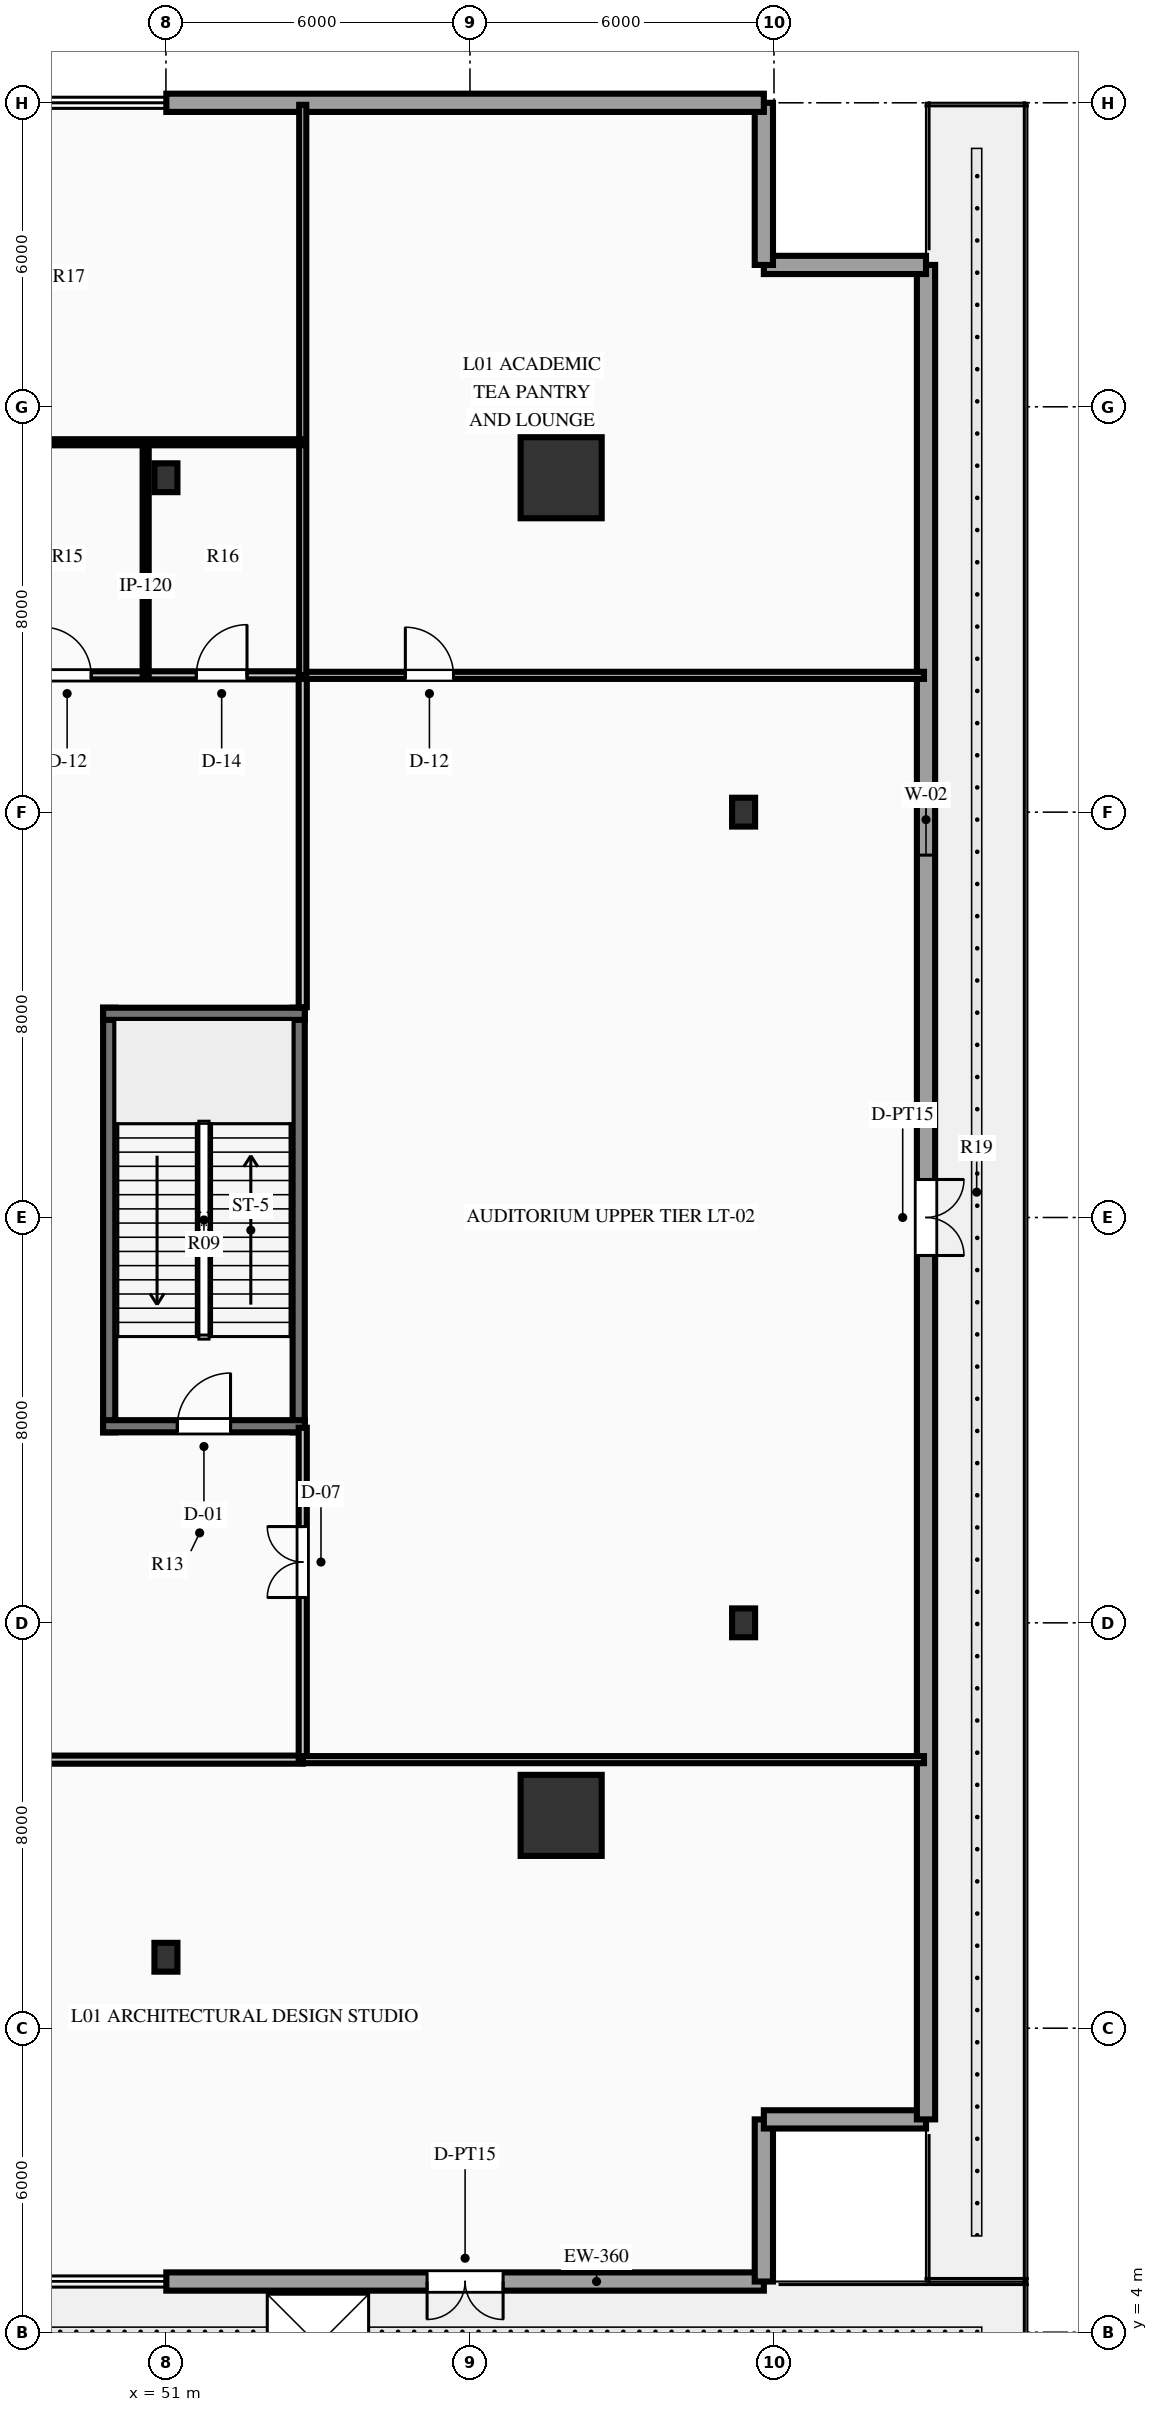
"""IFC4 building model, lengths in metres.
Left out: names, types, materials, properties, quantities, classifications, styles, units other than length and angle.
Written with IfcOpenShell. Run it as: python <this file> out.ifc"""

import sys

from ifc_helpers import new_model, si_unit, direction, frame, frame_2d, origin, origin_2d, place, context, subcontext, project, spatial, rectangle, hollow_rectangle, i_section, extrude, element, fill, save


model = new_model("IFC4")
c1 = context("Model", 3, precision=1e-05, world=origin(), true_north=direction((0.0, 1.0)))
c2 = subcontext(c1, "Body", "Model", "MODEL_VIEW")
j1 = project(units=[si_unit("LENGTHUNIT", "METRE"), si_unit("PLANEANGLEUNIT", "RADIAN")], contexts=[c1])
p1 = place(None, origin())
s1 = spatial("IfcSite", under=j1, at=p1, CompositionType="ELEMENT")
p2 = place(p1, origin())
s2 = spatial("IfcBuilding", under=s1, at=p2, CompositionType="ELEMENT")
p3 = place(p2, frame((0.0, 0.0, 6.0)))
s3 = spatial("IfcBuildingStorey", under=s2, at=p3, CompositionType="ELEMENT", Elevation=6.0)
for number, where, z_axis, x_axis in (
    (1, (49.88, 21.76, 0.0), (0.0, 0.0, 1.0), (0.0, 1.0, 0.0)),
    (2, (53.62, 21.76, 0.0), (0.0, 0.0, 1.0), (0.0, 1.0, 0.0)),
):
    element("IfcWall", number, at=place(p3, frame(where, z_axis=z_axis, x_axis=x_axis)), inside=s3, PredefinedType="SHEAR", context=c2, shape_type="SweptSolid", body=[
        extrude(rectangle(XDim=8.38, YDim=0.24, at=frame_2d((4.19, 0.0))), origin(), (0.0, 0.0, 1.0), 5.4),
    ])
p4 = place(p3, frame((49.76, 21.88, 0.0), z_axis=(0.0, 0.0, 1.0), x_axis=(1.0, 0.0, 0.0)))
e3 = element("IfcWall", 3, at=p4, inside=s3, PredefinedType="SHEAR", context=c2, shape_type="SweptSolid", body=[
    extrude(rectangle(XDim=3.98, YDim=0.24, at=frame_2d((1.99, 0.0))), origin(), (0.0, 0.0, 1.0), 5.4),
])
p5 = place(p4, frame((1.465, 0.0, 0.0)))
e4 = element("IfcOpeningElement", 4, at=p5, cuts=e3, PredefinedType="OPENING", context=c2, shape_type="SweptSolid", body=[
    extrude(rectangle(XDim=1.05, YDim=2.15, at=frame_2d((0.525, 1.075))), frame((0.0, 0.13, 0.0), z_axis=(0.0, -1.0, 0.0), x_axis=(1.0, 0.0, 0.0)), (0.0, 0.0, 1.0), 0.26),
])
p6 = place(p3, frame((49.76, 30.02, 0.0), z_axis=(0.0, 0.0, 1.0), x_axis=(1.0, 0.0, 0.0)))
e5 = element("IfcWall", 5, at=p6, inside=s3, PredefinedType="SHEAR", context=c2, shape_type="SweptSolid", body=[
    extrude(rectangle(XDim=3.98, YDim=0.24, at=frame_2d((1.99, 0.0))), origin(), (0.0, 0.0, 1.0), 5.4),
])
for number, where, z_axis, x_axis in (
    (6, (58.8, 14.2, 0.0), (0.0, 0.0, 1.0), (1.0, 0.0, 0.0)),
    (7, (58.8, 40.6, 0.0), (0.0, 0.0, 1.0), (1.0, 0.0, 0.0)),
):
    element("IfcColumn", number, at=place(p3, frame(where, z_axis=z_axis, x_axis=x_axis)), inside=s3, PredefinedType="COLUMN", context=c2, shape_type="SweptSolid", body=[
        extrude(hollow_rectangle(XDim=1.6, YDim=1.6, WallThickness=0.08, at=origin_2d()), origin(), (0.0, 0.0, 1.0), 5.4),
    ])
for number, where, z_axis, x_axis in (
    (8, (62.4, 18.0, 0.0), (0.0, 0.0, 1.0), (1.0, 0.0, 0.0)),
    (9, (62.4, 34.0, 0.0), (0.0, 0.0, 1.0), (1.0, 0.0, 0.0)),
    (10, (51.0, 11.4, 0.0), (0.0, 0.0, 1.0), (1.0, 0.0, 0.0)),
    (11, (51.0, 40.6, 0.0), (0.0, 0.0, 1.0), (1.0, 0.0, 0.0)),
):
    element("IfcColumn", number, at=place(p3, frame(where, z_axis=z_axis, x_axis=x_axis)), inside=s3, PredefinedType="COLUMN", context=c2, shape_type="SweptSolid", body=[
        extrude(i_section(OverallWidth=0.454, OverallDepth=0.569, WebThickness=0.078, FlangeThickness=0.125, at=origin_2d()), origin(), (0.0, 0.0, 1.0), 5.4),
    ])
p7 = place(p3, frame((62.8, 5.0, 0.0), z_axis=(0.0, 0.0, 1.0), x_axis=(-1.0, 0.0, 0.0)))
e12 = element("IfcWall", 12, at=p7, inside=s3, PredefinedType="STANDARD", context=c2, shape_type="SweptSolid", body=[
    extrude(rectangle(XDim=11.792, YDim=0.36, at=frame_2d((5.896, 0.0))), origin(), (0.0, 0.0, 1.0), 5.07),
])
p8 = place(p7, frame((5.146, 0.0, 0.0)))
e13 = element("IfcOpeningElement", 13, at=p8, cuts=e12, PredefinedType="OPENING", context=c2, shape_type="SweptSolid", body=[
    extrude(rectangle(XDim=1.5, YDim=2.25, at=frame_2d((0.75, 1.125))), frame((0.0, 0.19, 0.0), z_axis=(0.0, -1.0, 0.0), x_axis=(1.0, 0.0, 0.0)), (0.0, 0.0, 1.0), 0.38),
])
for number, where, z_axis, x_axis in (
    (14, (62.8, 8.2, 0.0), (0.0, 0.0, 1.0), (0.0, -1.0, 0.0)),
    (15, (66.0, 8.2, 0.0), (0.0, 0.0, 1.0), (-1.0, 0.0, 0.0)),
):
    element("IfcWall", number, at=place(p3, frame(where, z_axis=z_axis, x_axis=x_axis)), inside=s3, PredefinedType="STANDARD", context=c2, shape_type="SweptSolid", body=[
        extrude(rectangle(XDim=3.2, YDim=0.36, at=frame_2d((1.6, 0.0))), origin(), (0.0, 0.0, 1.0), 5.07),
    ])
p9 = place(p3, frame((66.0, 44.8, 0.0), z_axis=(0.0, 0.0, 1.0), x_axis=(0.0, -1.0, 0.0)))
e16 = element("IfcWall", 16, at=p9, inside=s3, PredefinedType="STANDARD", context=c2, shape_type="SweptSolid", body=[
    extrude(rectangle(XDim=36.6, YDim=0.36, at=frame_2d((18.3, 0.0))), origin(), (0.0, 0.0, 1.0), 5.07),
])
p10 = place(p9, frame((18.05, 0.0, 0.0)))
e17 = element("IfcOpeningElement", 17, at=p10, cuts=e16, PredefinedType="OPENING", context=c2, shape_type="SweptSolid", body=[
    extrude(rectangle(XDim=1.5, YDim=2.25, at=frame_2d((0.75, 1.125))), frame((0.0, 0.19, 0.0), z_axis=(0.0, -1.0, 0.0), x_axis=(1.0, 0.0, 0.0)), (0.0, 0.0, 1.0), 0.38),
])
p11 = place(p9, frame((10.248, 0.0, 1.0)))
e18 = element("IfcOpeningElement", 18, at=p11, cuts=e16, PredefinedType="OPENING", context=c2, shape_type="SweptSolid", body=[
    extrude(rectangle(XDim=1.4, YDim=2.2, at=frame_2d((0.7, 1.1))), frame((0.0, 0.19, 0.0), z_axis=(0.0, -1.0, 0.0), x_axis=(1.0, 0.0, 0.0)), (0.0, 0.0, 1.0), 0.38),
])
for number, where, z_axis, x_axis in (
    (19, (62.8, 44.8, 0.0), (0.0, 0.0, 1.0), (1.0, 0.0, 0.0)),
    (20, (62.8, 48.0, 0.0), (0.0, 0.0, 1.0), (0.0, -1.0, 0.0)),
):
    element("IfcWall", number, at=place(p3, frame(where, z_axis=z_axis, x_axis=x_axis)), inside=s3, PredefinedType="STANDARD", context=c2, shape_type="SweptSolid", body=[
        extrude(rectangle(XDim=3.2, YDim=0.36, at=frame_2d((1.6, 0.0))), origin(), (0.0, 0.0, 1.0), 5.07),
    ])
p12 = place(p3, frame((51.008, 48.0, 0.0), z_axis=(0.0, 0.0, 1.0), x_axis=(1.0, 0.0, 0.0)))
e21 = element("IfcWall", 21, at=p12, inside=s3, PredefinedType="STANDARD", context=c2, shape_type="SweptSolid", body=[
    extrude(rectangle(XDim=11.792, YDim=0.36, at=frame_2d((5.896, 0.0))), origin(), (0.0, 0.0, 1.0), 5.07),
])
p13 = place(p3, frame((18.3, 15.3, 0.0), z_axis=(0.0, 0.0, 1.0), x_axis=(1.0, 0.0, 0.0)))
e22 = element("IfcWall", 22, at=p13, inside=s3, PredefinedType="PARTITIONING", context=c2, shape_type="SweptSolid", body=[
    extrude(rectangle(XDim=35.4, YDim=0.16, at=frame_2d((17.7, 0.0))), origin(), (0.0, 0.0, 1.0), 4.292),
])
p14 = place(p13, frame((5.125, 0.0, 0.0)))
e23 = element("IfcOpeningElement", 23, at=p14, cuts=e22, PredefinedType="OPENING", context=c2, shape_type="SweptSolid", body=[
    extrude(rectangle(XDim=1.05, YDim=2.15, at=frame_2d((0.525, 1.075))), frame((0.0, 0.09, 0.0), z_axis=(0.0, -1.0, 0.0), x_axis=(1.0, 0.0, 0.0)), (0.0, 0.0, 1.0), 0.18),
])
p15 = place(p13, frame((16.4, 0.0, 0.0)))
e24 = element("IfcOpeningElement", 24, at=p15, cuts=e22, PredefinedType="OPENING", context=c2, shape_type="SweptSolid", body=[
    extrude(rectangle(XDim=1.4, YDim=2.2, at=frame_2d((0.7, 1.1))), frame((0.0, 0.09, 0.0), z_axis=(0.0, -1.0, 0.0), x_axis=(1.0, 0.0, 0.0)), (0.0, 0.0, 1.0), 0.18),
])
p16 = place(p13, frame((28.625, 0.0, 0.0)))
e25 = element("IfcOpeningElement", 25, at=p16, cuts=e22, PredefinedType="OPENING", context=c2, shape_type="SweptSolid", body=[
    extrude(rectangle(XDim=1.05, YDim=2.15, at=frame_2d((0.525, 1.075))), frame((0.0, 0.09, 0.0), z_axis=(0.0, -1.0, 0.0), x_axis=(1.0, 0.0, 0.0)), (0.0, 0.0, 1.0), 0.18),
])
p17 = place(p3, frame((18.3, 36.7, 0.0), z_axis=(0.0, 0.0, 1.0), x_axis=(1.0, 0.0, 0.0)))
e26 = element("IfcWall", 26, at=p17, inside=s3, PredefinedType="PARTITIONING", context=c2, shape_type="SweptSolid", body=[
    extrude(rectangle(XDim=35.4, YDim=0.16, at=frame_2d((17.7, 0.0))), origin(), (0.0, 0.0, 1.0), 5.07),
])
p18 = place(p17, frame((5.325, 0.0, 0.0)))
e27 = element("IfcOpeningElement", 27, at=p18, cuts=e26, PredefinedType="OPENING", context=c2, shape_type="SweptSolid", body=[
    extrude(rectangle(XDim=1.05, YDim=2.15, at=frame_2d((0.525, 1.075))), frame((0.0, 0.09, 0.0), z_axis=(0.0, -1.0, 0.0), x_axis=(1.0, 0.0, 0.0)), (0.0, 0.0, 1.0), 0.18),
])
p19 = place(p17, frame((17.575, 0.0, 0.0)))
e28 = element("IfcOpeningElement", 28, at=p19, cuts=e26, PredefinedType="OPENING", context=c2, shape_type="SweptSolid", body=[
    extrude(rectangle(XDim=1.05, YDim=2.15, at=frame_2d((0.525, 1.075))), frame((0.0, 0.09, 0.0), z_axis=(0.0, -1.0, 0.0), x_axis=(1.0, 0.0, 0.0)), (0.0, 0.0, 1.0), 0.18),
])
p20 = place(p17, frame((27.225, 0.0, 0.0)))
e29 = element("IfcOpeningElement", 29, at=p20, cuts=e26, PredefinedType="OPENING", context=c2, shape_type="SweptSolid", body=[
    extrude(rectangle(XDim=0.95, YDim=2.15, at=frame_2d((0.475, 1.075))), frame((0.0, 0.09, 0.0), z_axis=(0.0, -1.0, 0.0), x_axis=(1.0, 0.0, 0.0)), (0.0, 0.0, 1.0), 0.18),
])
p21 = place(p17, frame((30.275, 0.0, 0.0)))
e30 = element("IfcOpeningElement", 30, at=p21, cuts=e26, PredefinedType="OPENING", context=c2, shape_type="SweptSolid", body=[
    extrude(rectangle(XDim=0.95, YDim=2.15, at=frame_2d((0.475, 1.075))), frame((0.0, 0.09, 0.0), z_axis=(0.0, -1.0, 0.0), x_axis=(1.0, 0.0, 0.0)), (0.0, 0.0, 1.0), 0.18),
])
p22 = place(p17, frame((33.3, 0.0, 0.0)))
e31 = element("IfcOpeningElement", 31, at=p22, cuts=e26, PredefinedType="OPENING", context=c2, shape_type="SweptSolid", body=[
    extrude(rectangle(XDim=1.0, YDim=2.15, at=frame_2d((0.5, 1.075))), frame((0.0, 0.09, 0.0), z_axis=(0.0, -1.0, 0.0), x_axis=(1.0, 0.0, 0.0)), (0.0, 0.0, 1.0), 0.18),
])
p23 = place(p3, frame((53.7, 15.3, 0.0), z_axis=(0.0, 0.0, 1.0), x_axis=(0.0, 1.0, 0.0)))
e32 = element("IfcWall", 32, at=p23, inside=s3, PredefinedType="PARTITIONING", context=c2, shape_type="SweptSolid", body=[
    extrude(rectangle(XDim=6.55, YDim=0.16, at=frame_2d((3.275, 0.0))), origin(), (0.0, 0.0, 1.0), 5.07),
])
p24 = place(p23, frame((3.2, 0.0, 0.0)))
e33 = element("IfcOpeningElement", 33, at=p24, cuts=e32, PredefinedType="OPENING", context=c2, shape_type="SweptSolid", body=[
    extrude(rectangle(XDim=1.4, YDim=2.2, at=frame_2d((0.7, 1.1))), frame((0.0, 0.09, 0.0), z_axis=(0.0, -1.0, 0.0), x_axis=(1.0, 0.0, 0.0)), (0.0, 0.0, 1.0), 0.18),
])
p25 = place(p3, frame((53.7, 30.15, 0.0), z_axis=(0.0, 0.0, 1.0), x_axis=(0.0, 1.0, 0.0)))
e34 = element("IfcWall", 34, at=p25, inside=s3, PredefinedType="PARTITIONING", context=c2, shape_type="SweptSolid", body=[
    extrude(rectangle(XDim=6.55, YDim=0.16, at=frame_2d((3.275, 0.0))), origin(), (0.0, 0.0, 1.0), 5.07),
])
p26 = place(p3, frame((53.7, 15.3, 0.0), z_axis=(0.0, 0.0, 1.0), x_axis=(1.0, 0.0, 0.0)))
e35 = element("IfcWall", 35, at=p26, inside=s3, PredefinedType="PARTITIONING", context=c2, shape_type="SweptSolid", body=[
    extrude(rectangle(XDim=12.26, YDim=0.14, at=frame_2d((6.13, 0.0))), origin(), (0.0, 0.0, 1.0), 4.292),
])
p27 = place(p3, frame((53.7, 36.7, 0.0), z_axis=(0.0, 0.0, 1.0), x_axis=(1.0, 0.0, 0.0)))
e36 = element("IfcWall", 36, at=p27, inside=s3, PredefinedType="PARTITIONING", context=c2, shape_type="SweptSolid", body=[
    extrude(rectangle(XDim=12.26, YDim=0.14, at=frame_2d((6.13, 0.0))), origin(), (0.0, 0.0, 1.0), 5.07),
])
p28 = place(p27, frame((2.025, 0.0, 0.0)))
e37 = element("IfcOpeningElement", 37, at=p28, cuts=e36, PredefinedType="OPENING", context=c2, shape_type="SweptSolid", body=[
    extrude(rectangle(XDim=0.95, YDim=2.15, at=frame_2d((0.475, 1.075))), frame((0.0, 0.08, 0.0), z_axis=(0.0, -1.0, 0.0), x_axis=(1.0, 0.0, 0.0)), (0.0, 0.0, 1.0), 0.16),
])
p29 = place(p3, frame((53.7, 36.7, 0.0), z_axis=(0.0, 0.0, 1.0), x_axis=(0.0, 1.0, 0.0)))
e38 = element("IfcWall", 38, at=p29, inside=s3, PredefinedType="PARTITIONING", context=c2, shape_type="SweptSolid", body=[
    extrude(rectangle(XDim=11.26, YDim=0.14, at=frame_2d((5.63, 0.0))), origin(), (0.0, 0.0, 1.0), 5.07),
])
p30 = place(p3, frame((50.6, 36.7, 0.0), z_axis=(0.0, 0.0, 1.0), x_axis=(0.0, 1.0, 0.0)))
e39 = element("IfcWall", 39, at=p30, inside=s3, PredefinedType="PARTITIONING", context=c2, shape_type="SweptSolid", body=[
    extrude(rectangle(XDim=4.6, YDim=0.12, at=frame_2d((2.3, 0.0))), origin(), (0.0, 0.0, 1.0), 5.07),
])
p31 = place(p3, frame((44.5, 41.3, 0.0), z_axis=(0.0, 0.0, 1.0), x_axis=(1.0, 0.0, 0.0)))
e40 = element("IfcWall", 40, at=p31, inside=s3, PredefinedType="PARTITIONING", context=c2, shape_type="SweptSolid", body=[
    extrude(rectangle(XDim=9.2, YDim=0.12, at=frame_2d((4.6, 0.0))), origin(), (0.0, 0.0, 1.0), 4.292),
])
p32 = place(p8, origin())
e41 = element("IfcDoor", 41, at=p32, inside=s3, OperationType="DOUBLE_DOOR_SINGLE_SWING", PredefinedType="DOOR", context=c2, shape_type="SweptSolid", body=[
    extrude(rectangle(XDim=1.5, YDim=2.25, at=frame_2d((0.75, 1.125))), frame((0.0, 0.025, 0.0), z_axis=(0.0, -1.0, 0.0), x_axis=(1.0, 0.0, 0.0)), (0.0, 0.0, 1.0), 0.05),
])
fill(e13, e41)
p33 = place(p10, origin())
e42 = element("IfcDoor", 42, at=p33, inside=s3, OperationType="DOUBLE_DOOR_SINGLE_SWING", PredefinedType="DOOR", context=c2, shape_type="SweptSolid", body=[
    extrude(rectangle(XDim=1.5, YDim=2.25, at=frame_2d((0.75, 1.125))), frame((0.0, 0.025, 0.0), z_axis=(0.0, -1.0, 0.0), x_axis=(1.0, 0.0, 0.0)), (0.0, 0.0, 1.0), 0.05),
])
fill(e17, e42)
p34 = place(p11, origin())
e43 = element("IfcWindow", 43, at=p34, inside=s3, PartitioningType="SINGLE_PANEL", PredefinedType="WINDOW", context=c2, shape_type="SweptSolid", body=[
    extrude(rectangle(XDim=1.4, YDim=2.2, at=frame_2d((0.7, 1.1))), frame((0.0, 0.03, 0.0), z_axis=(0.0, -1.0, 0.0), x_axis=(1.0, 0.0, 0.0)), (0.0, 0.0, 1.0), 0.06),
])
fill(e18, e43)
p35 = place(p3, frame((0.0, 0.0, -0.25)))
p36 = place(p35, frame((54.0, 3.75, 0.2)))
e44 = element("IfcWindow", 44, at=p36, inside=s3, PartitioningType="SINGLE_PANEL", PredefinedType="SKYLIGHT", context=c2, shape_type="SweptSolid", body=[
    extrude(rectangle(XDim=2.0, YDim=2.0, at=origin_2d()), origin(), (0.0, 0.0, 1.0), 0.05),
])
p37 = place(p5, origin())
e45 = element("IfcDoor", 45, at=p37, inside=s3, OperationType="SINGLE_SWING_RIGHT", PredefinedType="DOOR", context=c2, shape_type="SweptSolid", body=[
    extrude(rectangle(XDim=1.05, YDim=2.15, at=frame_2d((0.525, 1.075))), frame((0.0, 0.025, 0.0), z_axis=(0.0, -1.0, 0.0), x_axis=(1.0, 0.0, 0.0)), (0.0, 0.0, 1.0), 0.05),
])
fill(e4, e45)
p38 = place(p24, origin())
e46 = element("IfcDoor", 46, at=p38, inside=s3, OperationType="DOUBLE_DOOR_SINGLE_SWING", PredefinedType="DOOR", context=c2, shape_type="SweptSolid", body=[
    extrude(rectangle(XDim=1.4, YDim=2.2, at=frame_2d((0.7, 1.1))), frame((0.0, 0.025, 0.0), z_axis=(0.0, -1.0, 0.0), x_axis=(1.0, 0.0, 0.0)), (0.0, 0.0, 1.0), 0.05),
])
fill(e33, e46)
p39 = place(p21, origin())
e47 = element("IfcDoor", 47, at=p39, inside=s3, OperationType="SINGLE_SWING_LEFT", PredefinedType="DOOR", context=c2, shape_type="SweptSolid", body=[
    extrude(rectangle(XDim=0.95, YDim=2.15, at=frame_2d((0.475, 1.075))), frame((0.0, 0.025, 0.0), z_axis=(0.0, -1.0, 0.0), x_axis=(1.0, 0.0, 0.0)), (0.0, 0.0, 1.0), 0.05),
])
fill(e30, e47)
p40 = place(p22, origin())
e48 = element("IfcDoor", 48, at=p40, inside=s3, OperationType="SINGLE_SWING_RIGHT", PredefinedType="DOOR", context=c2, shape_type="SweptSolid", body=[
    extrude(rectangle(XDim=1.0, YDim=2.15, at=frame_2d((0.5, 1.075))), frame((0.0, 0.025, 0.0), z_axis=(0.0, -1.0, 0.0), x_axis=(1.0, 0.0, 0.0)), (0.0, 0.0, 1.0), 0.05),
])
fill(e31, e48)
p41 = place(p28, origin())
e49 = element("IfcDoor", 49, at=p41, inside=s3, OperationType="SINGLE_SWING_LEFT", PredefinedType="DOOR", context=c2, shape_type="SweptSolid", body=[
    extrude(rectangle(XDim=0.95, YDim=2.15, at=frame_2d((0.475, 1.075))), frame((0.0, 0.025, 0.0), z_axis=(0.0, -1.0, 0.0), x_axis=(1.0, 0.0, 0.0)), (0.0, 0.0, 1.0), 0.05),
])
fill(e37, e49)
save(model, sys.argv[1])
